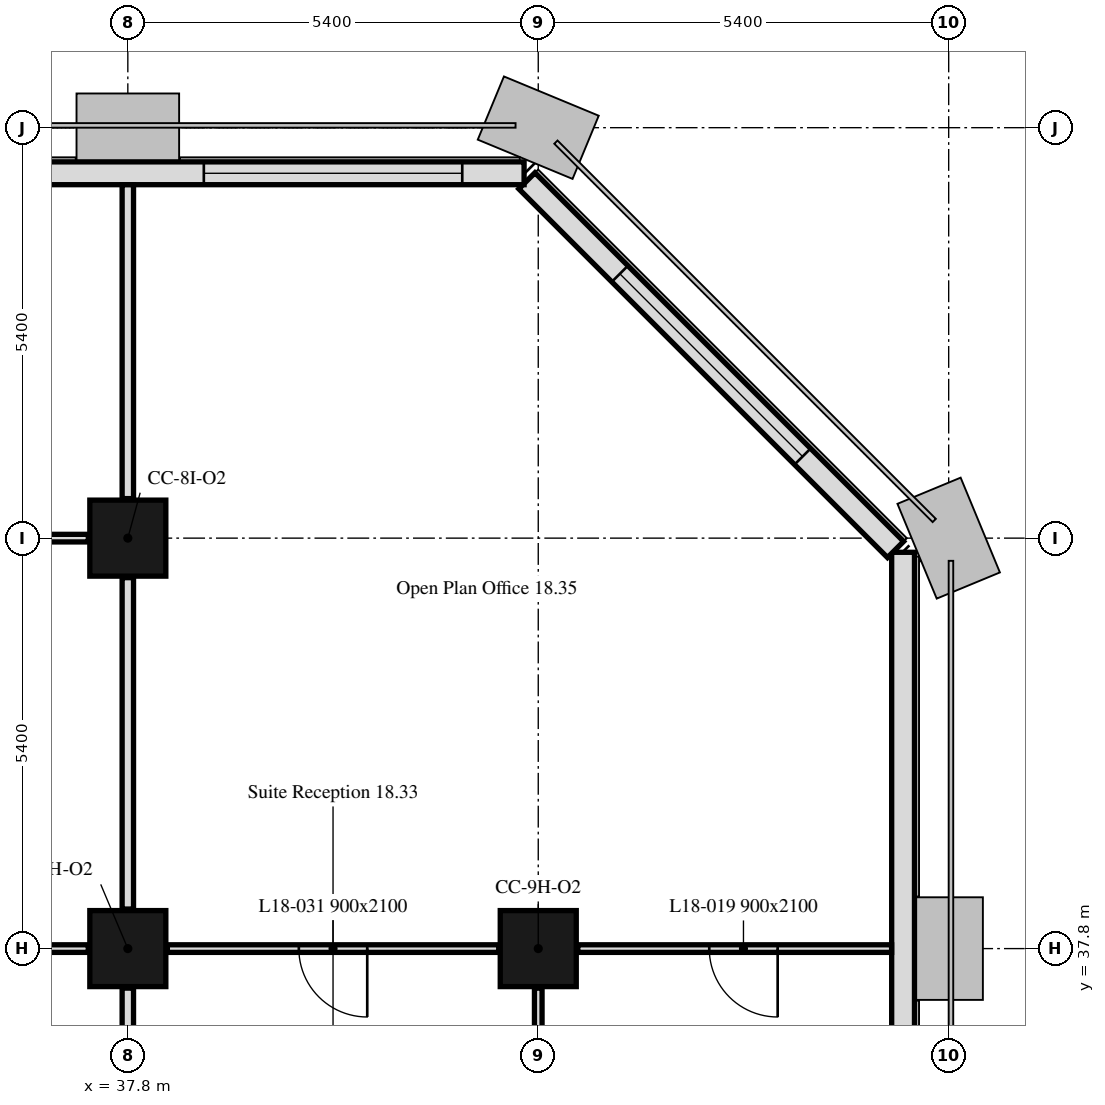
"""IFC4 building model, lengths in metres.
Left out: names, types, materials, properties, quantities, classifications, styles, units other than length and angle.
Written with IfcOpenShell. Run it as: python <this file> out.ifc"""

import sys

from ifc_helpers import new_model, si_unit, direction, frame, frame_2d, origin, origin_2d, place, context, subcontext, project, spatial, rectangle, extrude, element, fill, save


model = new_model("IFC4")
c1 = context("Model", 3, precision=1e-05, world=origin(), true_north=direction((0.0, 1.0)))
c2 = subcontext(c1, "Body", "Model", "MODEL_VIEW")
j1 = project(units=[si_unit("LENGTHUNIT", "METRE"), si_unit("PLANEANGLEUNIT", "RADIAN")], contexts=[c1])
p1 = place(None, origin())
s1 = spatial("IfcSite", under=j1, at=p1, CompositionType="ELEMENT")
p2 = place(p1, origin())
s2 = spatial("IfcBuilding", under=s1, at=p2, CompositionType="ELEMENT")
p3 = place(p2, frame((0.0, 0.0, 80.2)))
s3 = spatial("IfcBuildingStorey", under=s2, at=p3, CompositionType="ELEMENT", Elevation=80.2)
for number, where, z_axis, x_axis in (
    (1, (37.8, 37.8, 0.0), (0.0, 0.0, 1.0), (1.0, 0.0, 0.0)),
    (2, (43.2, 37.8, 0.0), (0.0, 0.0, 1.0), (1.0, 0.0, 0.0)),
    (3, (37.8, 43.2, 0.0), (0.0, 0.0, 1.0), (1.0, 0.0, 0.0)),
):
    element("IfcColumn", number, at=place(p3, frame(where, z_axis=z_axis, x_axis=x_axis)), inside=s3, PredefinedType="COLUMN", context=c2, shape_type="SweptSolid", body=[
        extrude(rectangle(XDim=1.0, YDim=1.0, at=origin_2d()), origin(), (0.0, 0.0, 1.0), 3.5),
    ])
p4 = place(p3, frame((48.0, 10.986, 0.0), z_axis=(0.0, 0.0, 1.0), x_axis=(0.0, 1.0, 0.0)))
e4 = element("IfcWall", 4, at=p4, inside=s3, PredefinedType="SOLIDWALL", context=c2, shape_type="SweptSolid", body=[
    extrude(rectangle(XDim=32.027, YDim=0.3, at=frame_2d((16.014, 0.0))), origin(), (0.0, 0.0, 1.0), 3.5),
])
p5 = place(p4, frame((1.164, 0.0, 0.9)))
e5 = element("IfcOpeningElement", 5, at=p5, cuts=e4, PredefinedType="OPENING", context=c2, shape_type="SweptSolid", body=[
    extrude(rectangle(XDim=1.1, YDim=1.7, at=frame_2d((0.55, 0.85))), frame((0.0, 0.16, 0.0), z_axis=(0.0, -1.0, 0.0), x_axis=(1.0, 0.0, 0.0)), (0.0, 0.0, 1.0), 0.32),
])
p6 = place(p4, frame((2.764, 0.0, 0.9)))
e6 = element("IfcOpeningElement", 6, at=p6, cuts=e4, PredefinedType="OPENING", context=c2, shape_type="SweptSolid", body=[
    extrude(rectangle(XDim=1.1, YDim=1.7, at=frame_2d((0.55, 0.85))), frame((0.0, 0.16, 0.0), z_axis=(0.0, -1.0, 0.0), x_axis=(1.0, 0.0, 0.0)), (0.0, 0.0, 1.0), 0.32),
])
p7 = place(p4, frame((11.614, 0.0, 0.9)))
e7 = element("IfcOpeningElement", 7, at=p7, cuts=e4, PredefinedType="OPENING", context=c2, shape_type="SweptSolid", body=[
    extrude(rectangle(XDim=3.4, YDim=1.7, at=frame_2d((1.7, 0.85))), frame((0.0, 0.16, 0.0), z_axis=(0.0, -1.0, 0.0), x_axis=(1.0, 0.0, 0.0)), (0.0, 0.0, 1.0), 0.32),
])
p8 = place(p4, frame((22.764, 0.0, 0.9)))
e8 = element("IfcOpeningElement", 8, at=p8, cuts=e4, PredefinedType="OPENING", context=c2, shape_type="SweptSolid", body=[
    extrude(rectangle(XDim=1.1, YDim=1.7, at=frame_2d((0.55, 0.85))), frame((0.0, 0.16, 0.0), z_axis=(0.0, -1.0, 0.0), x_axis=(1.0, 0.0, 0.0)), (0.0, 0.0, 1.0), 0.32),
])
p9 = place(p4, frame((24.364, 0.0, 0.9)))
e9 = element("IfcOpeningElement", 9, at=p9, cuts=e4, PredefinedType="OPENING", context=c2, shape_type="SweptSolid", body=[
    extrude(rectangle(XDim=1.1, YDim=1.7, at=frame_2d((0.55, 0.85))), frame((0.0, 0.16, 0.0), z_axis=(0.0, -1.0, 0.0), x_axis=(1.0, 0.0, 0.0)), (0.0, 0.0, 1.0), 0.32),
])
p10 = place(p3, frame((47.901, 43.051, 0.0), z_axis=(0.0, 0.0, 1.0), x_axis=(-0.707106781187, 0.707106781187, 0.0)))
e10 = element("IfcWall", 10, at=p10, inside=s3, PredefinedType="SOLIDWALL", context=c2, shape_type="SweptSolid", body=[
    extrude(rectangle(XDim=6.86, YDim=0.3, at=frame_2d((3.43, 0.0))), origin(), (0.0, 0.0, 1.0), 3.5),
])
p11 = place(p10, frame((1.73, 0.0, 0.9)))
e11 = element("IfcOpeningElement", 11, at=p11, cuts=e10, PredefinedType="OPENING", context=c2, shape_type="SweptSolid", body=[
    extrude(rectangle(XDim=3.4, YDim=1.7, at=frame_2d((1.7, 0.85))), frame((0.0, 0.16, 0.0), z_axis=(0.0, -1.0, 0.0), x_axis=(1.0, 0.0, 0.0)), (0.0, 0.0, 1.0), 0.32),
])
p12 = place(p3, frame((43.014, 48.0, 0.0), z_axis=(0.0, 0.0, 1.0), x_axis=(-1.0, 0.0, 0.0)))
e12 = element("IfcWall", 12, at=p12, inside=s3, PredefinedType="SOLIDWALL", context=c2, shape_type="SweptSolid", body=[
    extrude(rectangle(XDim=32.027, YDim=0.3, at=frame_2d((16.014, 0.0))), origin(), (0.0, 0.0, 1.0), 3.5),
])
p13 = place(p12, frame((0.814, 0.0, 0.9)))
e13 = element("IfcOpeningElement", 13, at=p13, cuts=e12, PredefinedType="OPENING", context=c2, shape_type="SweptSolid", body=[
    extrude(rectangle(XDim=3.4, YDim=1.7, at=frame_2d((1.7, 0.85))), frame((0.0, 0.16, 0.0), z_axis=(0.0, -1.0, 0.0), x_axis=(1.0, 0.0, 0.0)), (0.0, 0.0, 1.0), 0.32),
])
p14 = place(p12, frame((11.614, 0.0, 0.9)))
e14 = element("IfcOpeningElement", 14, at=p14, cuts=e12, PredefinedType="OPENING", context=c2, shape_type="SweptSolid", body=[
    extrude(rectangle(XDim=3.4, YDim=1.7, at=frame_2d((1.7, 0.85))), frame((0.0, 0.16, 0.0), z_axis=(0.0, -1.0, 0.0), x_axis=(1.0, 0.0, 0.0)), (0.0, 0.0, 1.0), 0.32),
])
p15 = place(p12, frame((22.414, 0.0, 0.9)))
e15 = element("IfcOpeningElement", 15, at=p15, cuts=e12, PredefinedType="OPENING", context=c2, shape_type="SweptSolid", body=[
    extrude(rectangle(XDim=3.4, YDim=1.7, at=frame_2d((1.7, 0.85))), frame((0.0, 0.16, 0.0), z_axis=(0.0, -1.0, 0.0), x_axis=(1.0, 0.0, 0.0)), (0.0, 0.0, 1.0), 0.32),
])
p16 = place(p3, frame((37.8, 35.175, 0.0), z_axis=(0.0, 0.0, 1.0), x_axis=(0.0, 1.0, 0.0)))
e16 = element("IfcWall", 16, at=p16, inside=s3, PredefinedType="PARTITIONING", context=c2, shape_type="SweptSolid", body=[
    extrude(rectangle(XDim=2.105, YDim=0.15, at=frame_2d((1.052, 0.0))), origin(), (0.0, 0.0, 1.0), 2.75),
])
p17 = place(p3, frame((37.28, 37.8, 0.0), z_axis=(0.0, 0.0, 1.0), x_axis=(-1.0, 0.0, 0.0)))
e17 = element("IfcWall", 17, at=p17, inside=s3, PredefinedType="PARTITIONING", context=c2, shape_type="SweptSolid", body=[
    extrude(rectangle(XDim=4.36, YDim=0.1, at=frame_2d((2.18, 0.0))), origin(), (0.0, 0.0, 1.0), 2.75),
])
p18 = place(p3, frame((37.8, 38.32, 0.0), z_axis=(0.0, 0.0, 1.0), x_axis=(0.0, 1.0, 0.0)))
e18 = element("IfcWall", 18, at=p18, inside=s3, PredefinedType="PARTITIONING", context=c2, shape_type="SweptSolid", body=[
    extrude(rectangle(XDim=4.36, YDim=0.15, at=frame_2d((2.18, 0.0))), origin(), (0.0, 0.0, 1.0), 2.75),
])
p19 = place(p3, frame((37.28, 43.2, 0.0), z_axis=(0.0, 0.0, 1.0), x_axis=(-1.0, 0.0, 0.0)))
e19 = element("IfcWall", 19, at=p19, inside=s3, PredefinedType="PARTITIONING", context=c2, shape_type="SweptSolid", body=[
    extrude(rectangle(XDim=4.36, YDim=0.1, at=frame_2d((2.18, 0.0))), origin(), (0.0, 0.0, 1.0), 3.5),
])
p20 = place(p19, frame((1.73, 0.0, 0.0)))
e20 = element("IfcOpeningElement", 20, at=p20, cuts=e19, PredefinedType="OPENING", context=c2, shape_type="SweptSolid", body=[
    extrude(rectangle(XDim=0.9, YDim=2.1, at=frame_2d((0.45, 1.05))), frame((0.0, 0.05, 0.0), z_axis=(0.0, -1.0, 0.0), x_axis=(1.0, 0.0, 0.0)), (0.0, 0.0, 1.0), 0.1),
])
p21 = place(p3, frame((37.8, 43.72, 0.0), z_axis=(0.0, 0.0, 1.0), x_axis=(0.0, 1.0, 0.0)))
e21 = element("IfcWall", 21, at=p21, inside=s3, PredefinedType="PARTITIONING", context=c2, shape_type="SweptSolid", body=[
    extrude(rectangle(XDim=4.129, YDim=0.15, at=frame_2d((2.064, 0.0))), origin(), (0.0, 0.0, 1.0), 2.75),
])
p22 = place(p3, frame((43.2, 35.175, 0.0), z_axis=(0.0, 0.0, 1.0), x_axis=(0.0, 1.0, 0.0)))
e22 = element("IfcWall", 22, at=p22, inside=s3, PredefinedType="PARTITIONING", context=c2, shape_type="SweptSolid", body=[
    extrude(rectangle(XDim=2.105, YDim=0.1, at=frame_2d((1.052, 0.0))), origin(), (0.0, 0.0, 1.0), 3.5),
])
p23 = place(p3, frame((42.68, 37.8, 0.0), z_axis=(0.0, 0.0, 1.0), x_axis=(-1.0, 0.0, 0.0)))
e23 = element("IfcWall", 23, at=p23, inside=s3, PredefinedType="PARTITIONING", context=c2, shape_type="SweptSolid", body=[
    extrude(rectangle(XDim=4.36, YDim=0.1, at=frame_2d((2.18, 0.0))), origin(), (0.0, 0.0, 1.0), 2.75),
])
p24 = place(p23, frame((1.73, 0.0, 0.0)))
e24 = element("IfcOpeningElement", 24, at=p24, cuts=e23, PredefinedType="OPENING", context=c2, shape_type="SweptSolid", body=[
    extrude(rectangle(XDim=0.9, YDim=2.1, at=frame_2d((0.45, 1.05))), frame((0.0, 0.05, 0.0), z_axis=(0.0, -1.0, 0.0), x_axis=(1.0, 0.0, 0.0)), (0.0, 0.0, 1.0), 0.1),
])
p25 = place(p3, frame((47.849, 37.8, 0.0), z_axis=(0.0, 0.0, 1.0), x_axis=(-1.0, 0.0, 0.0)))
e25 = element("IfcWall", 25, at=p25, inside=s3, PredefinedType="PARTITIONING", context=c2, shape_type="SweptSolid", body=[
    extrude(rectangle(XDim=4.129, YDim=0.1, at=frame_2d((2.064, 0.0))), origin(), (0.0, 0.0, 1.0), 2.75),
])
p26 = place(p25, frame((1.499, 0.0, 0.0)))
e26 = element("IfcOpeningElement", 26, at=p26, cuts=e25, PredefinedType="OPENING", context=c2, shape_type="SweptSolid", body=[
    extrude(rectangle(XDim=0.9, YDim=2.1, at=frame_2d((0.45, 1.05))), frame((0.0, 0.05, 0.0), z_axis=(0.0, -1.0, 0.0), x_axis=(1.0, 0.0, 0.0)), (0.0, 0.0, 1.0), 0.1),
])
p27 = place(p11, origin())
e27 = element("IfcWindow", 27, at=p27, inside=s3, PartitioningType="SINGLE_PANEL", PredefinedType="WINDOW", context=c2, shape_type="SweptSolid", body=[
    extrude(rectangle(XDim=3.4, YDim=1.7, at=frame_2d((1.7, 0.85))), frame((0.0, 0.03, 0.0), z_axis=(0.0, -1.0, 0.0), x_axis=(1.0, 0.0, 0.0)), (0.0, 0.0, 1.0), 0.06),
])
fill(e11, e27)
p28 = place(p13, origin())
e28 = element("IfcWindow", 28, at=p28, inside=s3, PartitioningType="SINGLE_PANEL", PredefinedType="WINDOW", context=c2, shape_type="SweptSolid", body=[
    extrude(rectangle(XDim=3.4, YDim=1.7, at=frame_2d((1.7, 0.85))), frame((0.0, 0.03, 0.0), z_axis=(0.0, -1.0, 0.0), x_axis=(1.0, 0.0, 0.0)), (0.0, 0.0, 1.0), 0.06),
])
fill(e13, e28)
p29 = place(p26, origin())
e29 = element("IfcDoor", 29, at=p29, inside=s3, OperationType="SINGLE_SWING_LEFT", PredefinedType="DOOR", context=c2, shape_type="SweptSolid", body=[
    extrude(rectangle(XDim=0.9, YDim=2.1, at=frame_2d((0.45, 1.05))), frame((0.0, 0.025, 0.0), z_axis=(0.0, -1.0, 0.0), x_axis=(1.0, 0.0, 0.0)), (0.0, 0.0, 1.0), 0.05),
])
fill(e26, e29)
p30 = place(p24, origin())
e30 = element("IfcDoor", 30, at=p30, inside=s3, OperationType="SINGLE_SWING_RIGHT", PredefinedType="DOOR", context=c2, shape_type="SweptSolid", body=[
    extrude(rectangle(XDim=0.9, YDim=2.1, at=frame_2d((0.45, 1.05))), frame((0.0, 0.025, 0.0), z_axis=(0.0, -1.0, 0.0), x_axis=(1.0, 0.0, 0.0)), (0.0, 0.0, 1.0), 0.05),
])
fill(e24, e30)
save(model, sys.argv[1])
